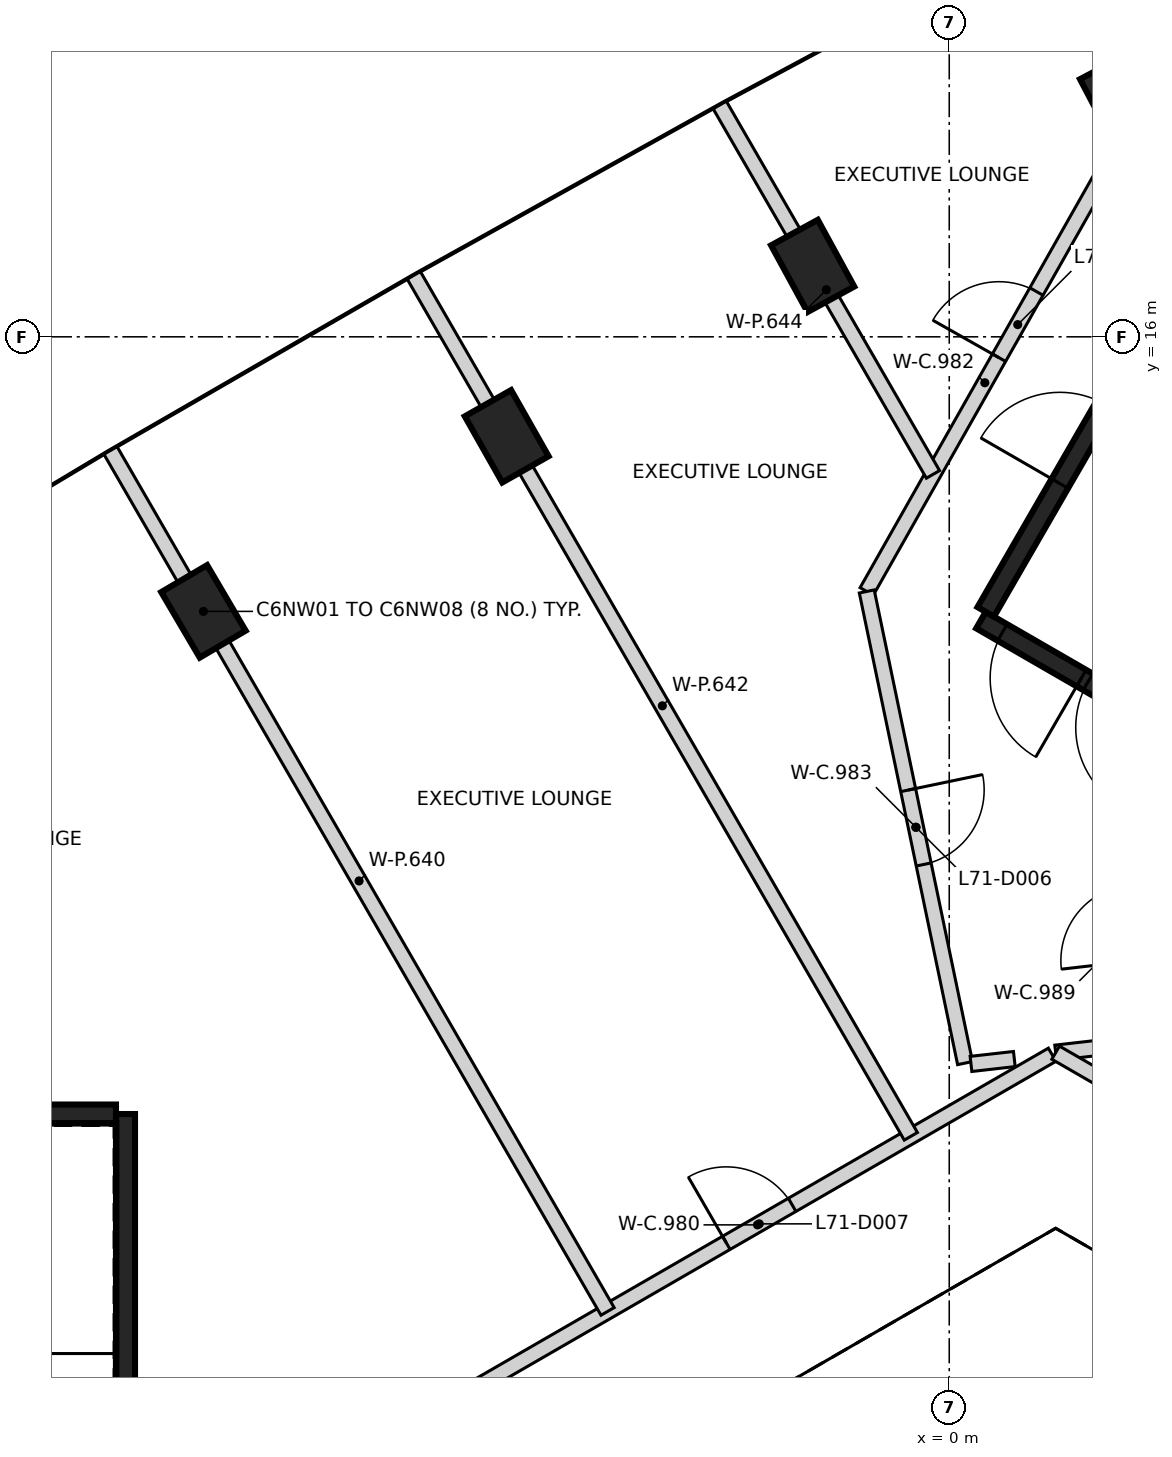
"""IFC4 building model, lengths in metres.
Left out: names, types, materials, properties, quantities, classifications, styles, units other than length and angle.
Written with IfcOpenShell. Run it as: python <this file> out.ifc"""

import sys

from ifc_helpers import new_model, si_unit, direction, frame, frame_2d, origin, origin_2d, place, context, subcontext, project, spatial, rectangle, extrude, element, fill, save


model = new_model("IFC4")
c1 = context("Model", 3, precision=1e-05, world=origin(), true_north=direction((0.0, 1.0)))
c2 = subcontext(c1, "Body", "Model", "MODEL_VIEW")
j1 = project(units=[si_unit("LENGTHUNIT", "METRE"), si_unit("PLANEANGLEUNIT", "RADIAN")], contexts=[c1])
p1 = place(None, origin())
s1 = spatial("IfcSite", under=j1, at=p1, CompositionType="ELEMENT")
p2 = place(p1, origin())
s2 = spatial("IfcBuilding", under=s1, at=p2, CompositionType="ELEMENT")
p3 = place(p2, frame((0.0, 0.0, 280.2)))
s3 = spatial("IfcBuildingStorey", under=s2, at=p3, CompositionType="ELEMENT", Elevation=280.2)
for number, where, z_axis, x_axis in (
    (1, (2.263, 19.11, -0.35), (0.0, 0.0, 1.0), (-0.466, 0.885, 0.0)),
    (2, (-1.797, 16.932, -0.35), (0.0, 0.0, 1.0), (-0.479, 0.878, 0.0)),
    (3, (-5.822, 14.691, -0.35), (0.0, 0.0, 1.0), (-0.493, 0.87, 0.0)),
    (4, (-9.812, 12.388, -0.35), (0.0, 0.0, 1.0), (-0.507, 0.862, 0.0)),
):
    element("IfcColumn", number, at=place(p3, frame(where, z_axis=z_axis, x_axis=x_axis)), inside=s3, PredefinedType="COLUMN", context=c2, shape_type="SweptSolid", body=[
        extrude(rectangle(XDim=1.0, YDim=0.7, at=origin_2d()), origin(), (0.0, 0.0, 1.0), 3.6),
    ])
p4 = place(p3, frame((-10.837, 5.775, 0.0), z_axis=(0.0, 0.0, 1.0), x_axis=(0.0, -1.0, 0.0)))
e5 = element("IfcWall", 5, at=p4, inside=s3, PredefinedType="SHEAR", context=c2, shape_type="SweptSolid", body=[
    extrude(rectangle(XDim=11.55, YDim=0.25, at=frame_2d((5.775, 0.0))), origin(), (0.0, 0.0, 1.0), 3.25),
])
p5 = place(p4, frame((10.025, 0.0, 0.0)))
e6 = element("IfcOpeningElement", 6, at=p5, cuts=e5, PredefinedType="OPENING", context=c2, shape_type="SweptSolid", body=[
    extrude(rectangle(XDim=1.2, YDim=2.1, at=frame_2d((0.6, 1.05))), frame((0.0, 0.135, 0.0), z_axis=(0.0, -1.0, 0.0), x_axis=(1.0, 0.0, 0.0)), (0.0, 0.0, 1.0), 0.27),
])
p6 = place(p4, frame((8.725, 0.0, 0.0)))
e7 = element("IfcOpeningElement", 7, at=p6, cuts=e5, PredefinedType="OPENING", context=c2, shape_type="SweptSolid", body=[
    extrude(rectangle(XDim=1.2, YDim=2.1, at=frame_2d((0.6, 1.05))), frame((0.0, 0.135, 0.0), z_axis=(0.0, -1.0, 0.0), x_axis=(1.0, 0.0, 0.0)), (0.0, 0.0, 1.0), 0.27),
])
p7 = place(p3, frame((-16.472, 5.775, 0.0), z_axis=(0.0, 0.0, 1.0), x_axis=(1.0, 0.0, 0.0)))
e8 = element("IfcWall", 8, at=p7, inside=s3, PredefinedType="SHEAR", context=c2, shape_type="SweptSolid", body=[
    extrude(rectangle(XDim=5.51, YDim=0.25, at=frame_2d((2.755, 0.0))), origin(), (0.0, 0.0, 1.0), 3.25),
])
p8 = place(p3, frame((10.42, 6.498, 0.0), z_axis=(0.0, 0.0, 1.0), x_axis=(-0.866021906294, 0.500006057782, 0.0)))
e9 = element("IfcWall", 9, at=p8, inside=s3, PredefinedType="SHEAR", context=c2, shape_type="SweptSolid", body=[
    extrude(rectangle(XDim=11.55, YDim=0.25, at=frame_2d((5.775, 0.0))), origin(), (0.0, 0.0, 1.0), 3.25),
])
p9 = place(p8, frame((10.025, 0.0, 0.0)))
e10 = element("IfcOpeningElement", 10, at=p9, cuts=e9, PredefinedType="OPENING", context=c2, shape_type="SweptSolid", body=[
    extrude(rectangle(XDim=1.2, YDim=2.1, at=frame_2d((0.6, 1.05))), frame((0.0, 0.135, 0.0), z_axis=(0.0, -1.0, 0.0), x_axis=(1.0, 0.0, 0.0)), (0.0, 0.0, 1.0), 0.27),
])
p10 = place(p8, frame((8.725, 0.0, 0.0)))
e11 = element("IfcOpeningElement", 11, at=p10, cuts=e9, PredefinedType="OPENING", context=c2, shape_type="SweptSolid", body=[
    extrude(rectangle(XDim=1.2, YDim=2.1, at=frame_2d((0.6, 1.05))), frame((0.0, 0.135, 0.0), z_axis=(0.0, -1.0, 0.0), x_axis=(1.0, 0.0, 0.0)), (0.0, 0.0, 1.0), 0.27),
])
p11 = place(p3, frame((0.48, 12.381, 0.0), z_axis=(0.0, 0.0, 1.0), x_axis=(0.49999885962, 0.866026062182, 0.0)))
e12 = element("IfcWall", 12, at=p11, inside=s3, PredefinedType="SHEAR", context=c2, shape_type="SweptSolid", body=[
    extrude(rectangle(XDim=5.225, YDim=0.25, at=frame_2d((2.612, 0.0))), origin(), (0.0, 0.0, 1.0), 3.25),
])
p12 = place(p11, frame((1.95, 0.0, 0.0)))
e13 = element("IfcOpeningElement", 13, at=p12, cuts=e12, PredefinedType="OPENING", context=c2, shape_type="SweptSolid", body=[
    extrude(rectangle(XDim=1.2, YDim=2.1, at=frame_2d((0.6, 1.05))), frame((0.0, 0.135, 0.0), z_axis=(0.0, -1.0, 0.0), x_axis=(1.0, 0.0, 0.0)), (0.0, 0.0, 1.0), 0.27),
])
p13 = place(p3, frame((-6.4, 2.079, 0.0), z_axis=(0.0, 0.0, 1.0), x_axis=(0.866044821263, 0.499966366432, 0.0)))
e14 = element("IfcWall", 14, at=p13, inside=s3, PredefinedType="PARTITIONING", context=c2, shape_type="SweptSolid", body=[
    extrude(rectangle(XDim=8.953, YDim=0.2, at=frame_2d((4.477, 0.0))), origin(), (0.0, 0.0, 1.0), 3.25),
])
p14 = place(p13, frame((4.003, 0.0, 0.0)))
e15 = element("IfcOpeningElement", 15, at=p14, cuts=e14, PredefinedType="OPENING", context=c2, shape_type="SweptSolid", body=[
    extrude(rectangle(XDim=1.0, YDim=2.1, at=frame_2d((0.5, 1.05))), frame((0.0, 0.11, 0.0), z_axis=(0.0, -1.0, 0.0), x_axis=(1.0, 0.0, 0.0)), (0.0, 0.0, 1.0), 0.22),
])
p15 = place(p3, frame((-1.086, 12.65, 0.0), z_axis=(0.0, 0.0, 1.0), x_axis=(0.492563383526, 0.870276572826, 0.0)))
e16 = element("IfcWall", 16, at=p15, inside=s3, PredefinedType="PARTITIONING", context=c2, shape_type="SweptSolid", body=[
    extrude(rectangle(XDim=6.309, YDim=0.2, at=frame_2d((3.155, 0.0))), origin(), (0.0, 0.0, 1.0), 3.25),
])
p16 = place(p15, frame((3.533, 0.0, 0.0)))
e17 = element("IfcOpeningElement", 17, at=p16, cuts=e16, PredefinedType="OPENING", context=c2, shape_type="SweptSolid", body=[
    extrude(rectangle(XDim=1.0, YDim=2.1, at=frame_2d((0.5, 1.05))), frame((0.0, 0.11, 0.0), z_axis=(0.0, -1.0, 0.0), x_axis=(1.0, 0.0, 0.0)), (0.0, 0.0, 1.0), 0.22),
])
p17 = place(p3, frame((-1.085, 12.65, 0.0), z_axis=(0.0, 0.0, 1.0), x_axis=(0.203998862084, -0.97897112535, 0.0)))
e18 = element("IfcWall", 18, at=p17, inside=s3, PredefinedType="PARTITIONING", context=c2, shape_type="SweptSolid", body=[
    extrude(rectangle(XDim=6.338, YDim=0.2, at=frame_2d((3.169, 0.0))), origin(), (0.0, 0.0, 1.0), 3.25),
])
p18 = place(p17, frame((2.669, 0.0, 0.0)))
e19 = element("IfcOpeningElement", 19, at=p18, cuts=e18, PredefinedType="OPENING", context=c2, shape_type="SweptSolid", body=[
    extrude(rectangle(XDim=1.0, YDim=2.1, at=frame_2d((0.5, 1.05))), frame((0.0, 0.11, 0.0), z_axis=(0.0, -1.0, 0.0), x_axis=(1.0, 0.0, 0.0)), (0.0, 0.0, 1.0), 0.22),
])
p19 = place(p3, frame((0.286, 6.434, 0.0), z_axis=(0.0, 0.0, 1.0), x_axis=(0.993674480486, 0.112298828274, 0.0)))
e20 = element("IfcWall", 20, at=p19, inside=s3, PredefinedType="PARTITIONING", context=c2, shape_type="SweptSolid", body=[
    extrude(rectangle(XDim=0.574, YDim=0.2, at=frame_2d((0.287, 0.0))), origin(), (0.0, 0.0, 1.0), 3.25),
])
p20 = place(p3, frame((1.4, 6.582, 0.0), z_axis=(0.0, 0.0, 1.0), x_axis=(0.993556915844, 0.11333426216, 0.0)))
e21 = element("IfcWall", 21, at=p20, inside=s3, PredefinedType="PARTITIONING", context=c2, shape_type="SweptSolid", body=[
    extrude(rectangle(XDim=1.2, YDim=0.2, at=frame_2d((0.6, 0.0))), origin(), (0.0, 0.0, 1.0), 3.25),
])
p21 = place(p3, frame((1.4, 6.582, 0.0), z_axis=(0.0, 0.0, 1.0), x_axis=(0.866066271601, -0.499929208183, 0.0)))
e22 = element("IfcWall", 22, at=p21, inside=s3, PredefinedType="PARTITIONING", context=c2, shape_type="SweptSolid", body=[
    extrude(rectangle(XDim=2.078, YDim=0.2, at=frame_2d((1.039, 0.0))), origin(), (0.0, 0.0, 1.0), 3.25),
])
p22 = place(p3, frame((-11.035, 14.505, 0.0), z_axis=(0.0, 0.0, 1.0), x_axis=(0.499989597041, -0.866031409852, 0.0)))
e23 = element("IfcWall", 23, at=p22, inside=s3, PredefinedType="PARTITIONING", context=c2, shape_type="SweptSolid", body=[
    extrude(rectangle(XDim=13.079, YDim=0.2, at=frame_2d((6.54, 0.0))), origin(), (0.0, 0.0, 1.0), 3.25),
])
p23 = place(p3, frame((-7.044, 16.809, 0.0), z_axis=(0.0, 0.0, 1.0), x_axis=(0.499997679687, -0.866026743414, 0.0)))
e24 = element("IfcWall", 24, at=p23, inside=s3, PredefinedType="PARTITIONING", context=c2, shape_type="SweptSolid", body=[
    extrude(rectangle(XDim=13.079, YDim=0.2, at=frame_2d((6.54, 0.0))), origin(), (0.0, 0.0, 1.0), 3.25),
])
p24 = place(p3, frame((-3.02, 19.05, 0.0), z_axis=(0.0, 0.0, 1.0), x_axis=(0.499943402613, -0.866058077835, 0.0)))
e25 = element("IfcWall", 25, at=p24, inside=s3, PredefinedType="PARTITIONING", context=c2, shape_type="SweptSolid", body=[
    extrude(rectangle(XDim=5.612, YDim=0.2, at=frame_2d((2.806, 0.0))), origin(), (0.0, 0.0, 1.0), 3.25),
])
p25 = place(p9, origin())
e26 = element("IfcDoor", 26, at=p25, inside=s3, OperationType="SINGLE_SWING_LEFT", PredefinedType="DOOR", context=c2, shape_type="SweptSolid", body=[
    extrude(rectangle(XDim=1.2, YDim=2.1, at=frame_2d((0.6, 1.05))), frame((0.0, 0.025, 0.0), z_axis=(0.0, -1.0, 0.0), x_axis=(1.0, 0.0, 0.0)), (0.0, 0.0, 1.0), 0.05),
])
fill(e10, e26)
p26 = place(p10, origin())
e27 = element("IfcDoor", 27, at=p26, inside=s3, OperationType="SINGLE_SWING_RIGHT", PredefinedType="DOOR", context=c2, shape_type="SweptSolid", body=[
    extrude(rectangle(XDim=1.2, YDim=2.1, at=frame_2d((0.6, 1.05))), frame((0.0, 0.025, 0.0), z_axis=(0.0, -1.0, 0.0), x_axis=(1.0, 0.0, 0.0)), (0.0, 0.0, 1.0), 0.05),
])
fill(e11, e27)
p27 = place(p12, origin())
e28 = element("IfcDoor", 28, at=p27, inside=s3, OperationType="SINGLE_SWING_RIGHT", PredefinedType="DOOR", context=c2, shape_type="SweptSolid", body=[
    extrude(rectangle(XDim=1.2, YDim=2.1, at=frame_2d((0.6, 1.05))), frame((0.0, 0.025, 0.0), z_axis=(0.0, -1.0, 0.0), x_axis=(1.0, 0.0, 0.0)), (0.0, 0.0, 1.0), 0.05),
])
fill(e13, e28)
p28 = place(p16, frame((1.0, 0.0, 0.0), z_axis=(0.0, 0.0, 1.0), x_axis=(-1.0, 0.0, 0.0)))
e29 = element("IfcDoor", 29, at=p28, inside=s3, OperationType="SINGLE_SWING_LEFT", PredefinedType="DOOR", context=c2, shape_type="SweptSolid", body=[
    extrude(rectangle(XDim=1.0, YDim=2.1, at=frame_2d((0.5, 1.05))), frame((0.0, 0.025, 0.0), z_axis=(0.0, -1.0, 0.0), x_axis=(1.0, 0.0, 0.0)), (0.0, 0.0, 1.0), 0.05),
])
fill(e17, e29)
p29 = place(p18, frame((1.0, 0.0, 0.0), z_axis=(0.0, 0.0, 1.0), x_axis=(-1.0, 0.0, 0.0)))
e30 = element("IfcDoor", 30, at=p29, inside=s3, OperationType="SINGLE_SWING_LEFT", PredefinedType="DOOR", context=c2, shape_type="SweptSolid", body=[
    extrude(rectangle(XDim=1.0, YDim=2.1, at=frame_2d((0.5, 1.05))), frame((0.0, 0.025, 0.0), z_axis=(0.0, -1.0, 0.0), x_axis=(1.0, 0.0, 0.0)), (0.0, 0.0, 1.0), 0.05),
])
fill(e19, e30)
p30 = place(p14, origin())
e31 = element("IfcDoor", 31, at=p30, inside=s3, OperationType="SINGLE_SWING_LEFT", PredefinedType="DOOR", context=c2, shape_type="SweptSolid", body=[
    extrude(rectangle(XDim=1.0, YDim=2.1, at=frame_2d((0.5, 1.05))), frame((0.0, 0.025, 0.0), z_axis=(0.0, -1.0, 0.0), x_axis=(1.0, 0.0, 0.0)), (0.0, 0.0, 1.0), 0.05),
])
fill(e15, e31)
save(model, sys.argv[1])
